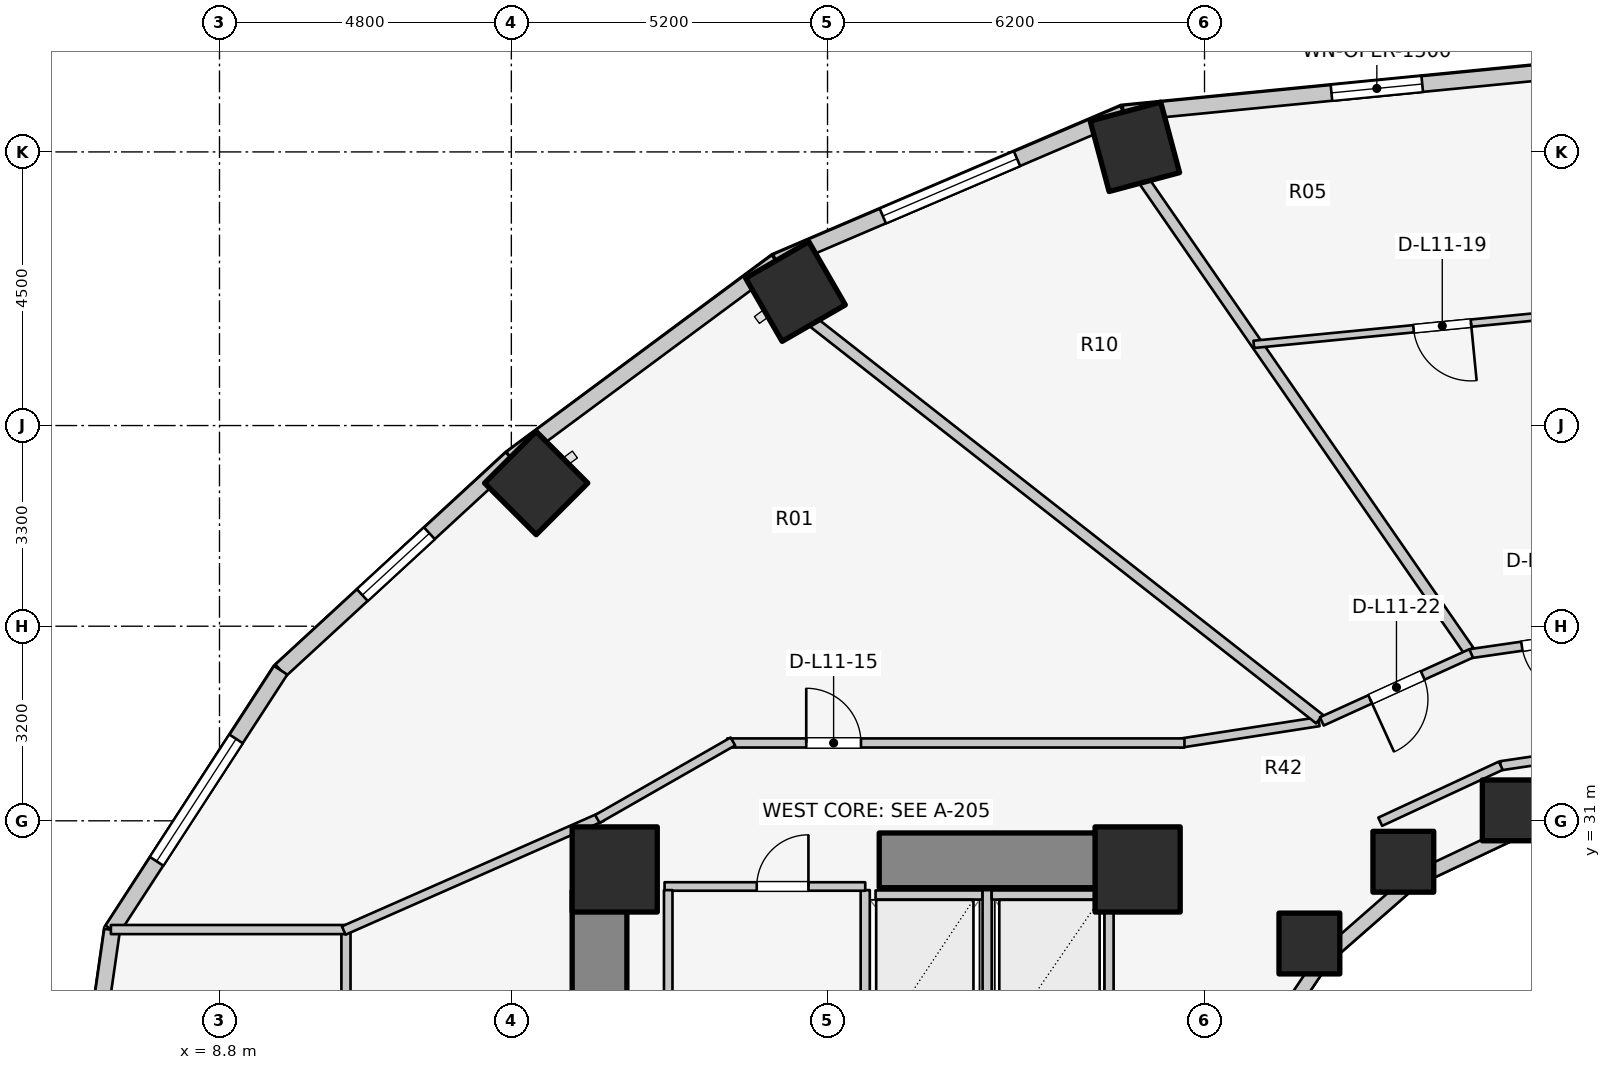
"""IFC4 building model, lengths in metres.
Left out: names, types, materials, properties, quantities, classifications, styles, units other than length and angle.
Written with IfcOpenShell. Run it as: python <this file> out.ifc"""

import sys

from ifc_helpers import new_model, si_unit, direction, frame, frame_2d, origin, origin_2d, place, context, subcontext, project, spatial, rectangle, extrude, element, fill, save


model = new_model("IFC4")
c1 = context("Model", 3, precision=1e-05, world=origin(), true_north=direction((0.0, 1.0)))
c2 = subcontext(c1, "Body", "Model", "MODEL_VIEW")
j1 = project(units=[si_unit("LENGTHUNIT", "METRE"), si_unit("PLANEANGLEUNIT", "RADIAN")], contexts=[c1])
p1 = place(None, origin())
s1 = spatial("IfcSite", under=j1, at=p1, CompositionType="ELEMENT")
p2 = place(p1, origin())
s2 = spatial("IfcBuilding", under=s1, at=p2, CompositionType="ELEMENT")
p3 = place(p2, frame((0.0, 0.0, 40.0)))
s3 = spatial("IfcBuildingStorey", under=s2, at=p3, CompositionType="ELEMENT", Elevation=40.0)
p4 = place(p3, frame((15.05, 17.05, 0.0), z_axis=(0.0, 0.0, 1.0), x_axis=(0.0, 1.0, 0.0)))
e1 = element("IfcWall", 1, at=p4, inside=s3, PredefinedType="SHEAR", context=c2, shape_type="SweptSolid", body=[
    extrude(rectangle(XDim=12.8, YDim=0.9, at=frame_2d((6.4, 0.0))), origin(), (0.0, 0.0, 1.0), 3.1),
])
p5 = place(p3, frame((19.65, 30.35, 0.0), z_axis=(0.0, 0.0, 1.0), x_axis=(1.0, 0.0, 0.0)))
e2 = element("IfcWall", 2, at=p5, inside=s3, PredefinedType="SHEAR", context=c2, shape_type="SweptSolid", body=[
    extrude(rectangle(XDim=4.5, YDim=0.9, at=frame_2d((2.25, 0.0))), origin(), (0.0, 0.0, 1.0), 3.1),
])
for number, where, z_axis, x_axis in (
    (3, (23.9, 30.2, 0.0), (0.0, 0.0, 1.0), (1.0, 0.0, 0.0)),
    (4, (15.3, 30.2, 0.0), (0.0, 0.0, 1.0), (1.0, 0.0, 0.0)),
):
    element("IfcColumn", number, at=place(p3, frame(where, z_axis=z_axis, x_axis=x_axis)), inside=s3, PredefinedType="COLUMN", context=c2, shape_type="SweptSolid", body=[
        extrude(rectangle(XDim=1.4, YDim=1.4, at=origin_2d()), origin(), (0.0, 0.0, 1.0), 3.1),
    ])
p6 = place(p3, frame((30.069, 31.172, 0.0), z_axis=(0.0, 0.0, 1.0), x_axis=(1.0, 0.0, 0.0)))
e5 = element("IfcColumn", 5, at=p6, inside=s3, PredefinedType="COLUMN", context=c2, shape_type="SweptSolid", body=[
    extrude(rectangle(XDim=1.0, YDim=1.0, at=origin_2d()), origin(), (0.0, 0.0, 1.0), 3.1),
])
p7 = place(p3, frame((23.855, 42.084, 0.0), z_axis=(0.0, 0.0, 1.0), x_axis=(-0.258819045103, 0.965925826289, 0.0)))
e6 = element("IfcColumn", 6, at=p7, inside=s3, PredefinedType="COLUMN", context=c2, shape_type="SweptSolid", body=[
    extrude(rectangle(XDim=1.2, YDim=1.2, at=origin_2d()), origin(), (0.0, 0.0, 1.0), 3.1),
])
p8 = place(p3, frame((28.27, 30.327, 0.0), z_axis=(0.0, 0.0, 1.0), x_axis=(1.0, 0.0, 0.0)))
e7 = element("IfcColumn", 7, at=p8, inside=s3, PredefinedType="COLUMN", context=c2, shape_type="SweptSolid", body=[
    extrude(rectangle(XDim=1.0, YDim=1.0, at=origin_2d()), origin(), (0.0, 0.0, 1.0), 3.1),
])
p9 = place(p3, frame((18.273, 39.704, 0.0), z_axis=(0.0, 0.0, 1.0), x_axis=(-0.5, 0.866025403784, 0.0)))
e8 = element("IfcColumn", 8, at=p9, inside=s3, PredefinedType="COLUMN", context=c2, shape_type="SweptSolid", body=[
    extrude(rectangle(XDim=1.2, YDim=1.2, at=origin_2d()), origin(), (0.0, 0.0, 1.0), 3.1),
])
p10 = place(p3, frame((26.725, 28.982, 0.0), z_axis=(0.0, 0.0, 1.0), x_axis=(1.0, 0.0, 0.0)))
e9 = element("IfcColumn", 9, at=p10, inside=s3, PredefinedType="COLUMN", context=c2, shape_type="SweptSolid", body=[
    extrude(rectangle(XDim=1.0, YDim=1.0, at=origin_2d()), origin(), (0.0, 0.0, 1.0), 3.1),
])
p11 = place(p3, frame((14.008, 36.554, 0.0), z_axis=(0.0, 0.0, 1.0), x_axis=(-0.707106781187, 0.707106781187, 0.0)))
e10 = element("IfcColumn", 10, at=p11, inside=s3, PredefinedType="COLUMN", context=c2, shape_type="SweptSolid", body=[
    extrude(rectangle(XDim=1.2, YDim=1.2, at=origin_2d()), origin(), (0.0, 0.0, 1.0), 3.1),
])
p12 = place(p3, frame((32.0, 31.12, 0.0), z_axis=(0.0, 0.0, 1.0), x_axis=(-0.988901730308, -0.148571086668, 0.0)))
e11 = element("IfcWall", 11, at=p12, inside=s3, PredefinedType="STANDARD", context=c2, shape_type="SweptSolid", body=[
    extrude(rectangle(XDim=1.864, YDim=0.23, at=frame_2d((0.932, 0.0))), origin(), (0.0, 0.0, 1.0), 2.16),
])
p13 = place(p3, frame((30.157, 30.843, 0.0), z_axis=(0.0, 0.0, 1.0), x_axis=(-0.904179699603, -0.427152280606, 0.0)))
e12 = element("IfcWall", 12, at=p13, inside=s3, PredefinedType="STANDARD", context=c2, shape_type="SweptSolid", body=[
    extrude(rectangle(XDim=1.899, YDim=0.23, at=frame_2d((0.95, 0.0))), origin(), (0.0, 0.0, 1.0), 2.16),
])
p14 = place(p3, frame((28.44, 30.032, 0.0), z_axis=(0.0, 0.0, 1.0), x_axis=(-0.752576694707, -0.658504607869, 0.0)))
e13 = element("IfcWall", 13, at=p14, inside=s3, PredefinedType="STANDARD", context=c2, shape_type="SweptSolid", body=[
    extrude(rectangle(XDim=1.959, YDim=0.23, at=frame_2d((0.98, 0.0))), origin(), (0.0, 0.0, 1.0), 2.16),
])
p15 = place(p3, frame((26.965, 28.742, 0.0), z_axis=(0.0, 0.0, 1.0), x_axis=(-0.558197800898, -0.829707909492, 0.0)))
e14 = element("IfcWall", 14, at=p15, inside=s3, PredefinedType="STANDARD", context=c2, shape_type="SweptSolid", body=[
    extrude(rectangle(XDim=2.027, YDim=0.23, at=frame_2d((1.013, 0.0))), origin(), (0.0, 0.0, 1.0), 2.16),
])
p16 = place(p3, frame((32.0, 43.451, 0.0), z_axis=(0.0, 0.0, 1.0), x_axis=(-0.995247718352, -0.097375454379, 0.0)))
e15 = element("IfcWall", 15, at=p16, inside=s3, PredefinedType="STANDARD", context=c2, shape_type="SweptSolid", body=[
    extrude(rectangle(XDim=8.372, YDim=0.26, at=frame_2d((4.186, 0.0))), origin(), (0.0, 0.0, 1.0), 2.85),
])
p17 = place(p16, frame((3.436, 0.0, 0.75)))
e16 = element("IfcOpeningElement", 16, at=p17, cuts=e15, PredefinedType="OPENING", context=c2, shape_type="SweptSolid", body=[
    extrude(rectangle(XDim=1.5, YDim=1.6, at=frame_2d((0.75, 0.8))), frame((0.0, 0.14, 0.0), z_axis=(0.0, -1.0, 0.0), x_axis=(1.0, 0.0, 0.0)), (0.0, 0.0, 1.0), 0.28),
])
p18 = place(p3, frame((23.668, 42.636, 0.0), z_axis=(0.0, 0.0, 1.0), x_axis=(-0.919612132394, -0.39282760335, 0.0)))
e17 = element("IfcWall", 17, at=p18, inside=s3, PredefinedType="STANDARD", context=c2, shape_type="SweptSolid", body=[
    extrude(rectangle(XDim=6.209, YDim=0.26, at=frame_2d((3.105, 0.0))), origin(), (0.0, 0.0, 1.0), 2.85),
])
p19 = place(p18, frame((1.905, 0.0, 0.75)))
e18 = element("IfcOpeningElement", 18, at=p19, cuts=e17, PredefinedType="OPENING", context=c2, shape_type="SweptSolid", body=[
    extrude(rectangle(XDim=2.4, YDim=1.7, at=frame_2d((1.2, 0.85))), frame((0.0, 0.14, 0.0), z_axis=(0.0, -1.0, 0.0), x_axis=(1.0, 0.0, 0.0)), (0.0, 0.0, 1.0), 0.28),
])
p20 = place(p3, frame((17.958, 40.197, 0.0), z_axis=(0.0, 0.0, 1.0), x_axis=(-0.803477531792, -0.595335078679, 0.0)))
e19 = element("IfcWall", 19, at=p20, inside=s3, PredefinedType="STANDARD", context=c2, shape_type="SweptSolid", body=[
    extrude(rectangle(XDim=5.43, YDim=0.26, at=frame_2d((2.715, 0.0))), origin(), (0.0, 0.0, 1.0), 2.85),
])
p21 = place(p3, frame((13.595, 36.965, 0.0), z_axis=(0.0, 0.0, 1.0), x_axis=(-0.735655109293, -0.67735630223, 0.0)))
e20 = element("IfcWall", 20, at=p21, inside=s3, PredefinedType="STANDARD", context=c2, shape_type="SweptSolid", body=[
    extrude(rectangle(XDim=5.151, YDim=0.26, at=frame_2d((2.575, 0.0))), origin(), (0.0, 0.0, 1.0), 2.85),
])
p22 = place(p21, frame((1.825, 0.0, 0.75)))
e21 = element("IfcOpeningElement", 21, at=p22, cuts=e20, PredefinedType="OPENING", context=c2, shape_type="SweptSolid", body=[
    extrude(rectangle(XDim=1.5, YDim=1.6, at=frame_2d((0.75, 0.8))), frame((0.0, 0.14, 0.0), z_axis=(0.0, -1.0, 0.0), x_axis=(1.0, 0.0, 0.0)), (0.0, 0.0, 1.0), 0.28),
])
p23 = place(p3, frame((9.806, 33.476, 0.0), z_axis=(0.0, 0.0, 1.0), x_axis=(-0.544578722263, -0.838709732421, 0.0)))
e22 = element("IfcWall", 22, at=p23, inside=s3, PredefinedType="STANDARD", context=c2, shape_type="SweptSolid", body=[
    extrude(rectangle(XDim=5.092, YDim=0.26, at=frame_2d((2.546, 0.0))), origin(), (0.0, 0.0, 1.0), 2.85),
])
p24 = place(p23, frame((1.346, 0.0, 0.75)))
e23 = element("IfcOpeningElement", 23, at=p24, cuts=e22, PredefinedType="OPENING", context=c2, shape_type="SweptSolid", body=[
    extrude(rectangle(XDim=2.4, YDim=1.7, at=frame_2d((1.2, 0.85))), frame((0.0, 0.14, 0.0), z_axis=(0.0, -1.0, 0.0), x_axis=(1.0, 0.0, 0.0)), (0.0, 0.0, 1.0), 0.28),
])
p25 = place(p3, frame((7.033, 29.205, 0.0), z_axis=(0.0, 0.0, 1.0), x_axis=(-0.142528001686, -0.989790770181, 0.0)))
e24 = element("IfcWall", 24, at=p25, inside=s3, PredefinedType="STANDARD", context=c2, shape_type="SweptSolid", body=[
    extrude(rectangle(XDim=6.269, YDim=0.26, at=frame_2d((3.135, 0.0))), origin(), (0.0, 0.0, 1.0), 2.85),
])
p26 = place(p25, frame((2.385, 0.0, 0.75)))
e25 = element("IfcOpeningElement", 25, at=p26, cuts=e24, PredefinedType="OPENING", context=c2, shape_type="SweptSolid", body=[
    extrude(rectangle(XDim=1.5, YDim=1.6, at=frame_2d((0.75, 0.8))), frame((0.0, 0.14, 0.0), z_axis=(0.0, -1.0, 0.0), x_axis=(1.0, 0.0, 0.0)), (0.0, 0.0, 1.0), 0.28),
])
p27 = place(p3, frame((19.59, 29.78, 0.0), z_axis=(0.0, 0.0, 1.0), x_axis=(1.0, 0.0, 0.0)))
e26 = element("IfcWall", 26, at=p27, inside=s3, PredefinedType="SOLIDWALL", context=c2, shape_type="SweptSolid", body=[
    extrude(rectangle(XDim=1.76, YDim=0.15, at=frame_2d((0.88, 0.0))), origin(), (0.0, 0.0, 1.0), 2.855),
])
for number, where, z_axis, x_axis in (
    (27, (19.42, 27.14, 0.0), (0.0, 0.0, 1.0), (0.0, 1.0, 0.0)),
    (28, (21.425, 27.14, 0.0), (0.0, 0.0, 1.0), (0.0, 1.0, 0.0)),
):
    element("IfcWall", number, at=place(p3, frame(where, z_axis=z_axis, x_axis=x_axis)), inside=s3, PredefinedType="SOLIDWALL", context=c2, shape_type="SweptSolid", body=[
        extrude(rectangle(XDim=2.72, YDim=0.15, at=frame_2d((1.36, 0.0))), origin(), (0.0, 0.0, 1.0), 2.855),
    ])
p28 = place(p3, frame((21.5, 29.78, 0.0), z_axis=(0.0, 0.0, 1.0), x_axis=(1.0, 0.0, 0.0)))
e29 = element("IfcWall", 29, at=p28, inside=s3, PredefinedType="SOLIDWALL", context=c2, shape_type="SweptSolid", body=[
    extrude(rectangle(XDim=1.76, YDim=0.15, at=frame_2d((0.88, 0.0))), origin(), (0.0, 0.0, 1.0), 2.855),
])
p29 = place(p3, frame((23.43, 27.14, 0.0), z_axis=(0.0, 0.0, 1.0), x_axis=(0.0, 1.0, 0.0)))
e30 = element("IfcWall", 30, at=p29, inside=s3, PredefinedType="SOLIDWALL", context=c2, shape_type="SweptSolid", body=[
    extrude(rectangle(XDim=2.72, YDim=0.15, at=frame_2d((1.36, 0.0))), origin(), (0.0, 0.0, 1.0), 2.855),
])
p30 = place(p3, frame((16.12, 29.92, 0.0), z_axis=(0.0, 0.0, 1.0), x_axis=(1.0, 0.0, 0.0)))
e31 = element("IfcWall", 31, at=p30, inside=s3, PredefinedType="PLUMBINGWALL", context=c2, shape_type="SweptSolid", body=[
    extrude(rectangle(XDim=3.3, YDim=0.14, at=frame_2d((1.65, 0.0))), origin(), (0.0, 0.0, 1.0), 2.855),
])
p31 = place(p30, frame((1.516, 0.0, 0.0)))
e32 = element("IfcOpeningElement", 32, at=p31, cuts=e31, PredefinedType="OPENING", context=c2, shape_type="SweptSolid", body=[
    extrude(rectangle(XDim=0.85, YDim=2.05, at=frame_2d((0.425, 1.025))), frame((0.0, 0.08, 0.0), z_axis=(0.0, -1.0, 0.0), x_axis=(1.0, 0.0, 0.0)), (0.0, 0.0, 1.0), 0.16),
])
p32 = place(p3, frame((16.18, 25.98, 0.0), z_axis=(0.0, 0.0, 1.0), x_axis=(0.0, 1.0, 0.0)))
e33 = element("IfcWall", 33, at=p32, inside=s3, PredefinedType="PLUMBINGWALL", context=c2, shape_type="SweptSolid", body=[
    extrude(rectangle(XDim=3.88, YDim=0.14, at=frame_2d((1.94, 0.0))), origin(), (0.0, 0.0, 1.0), 2.855),
])
p33 = place(p3, frame((32.0, 32.22, 0.0), z_axis=(0.0, 0.0, 1.0), x_axis=(-0.989268584896, -0.146108408166, 0.0)))
e34 = element("IfcWall", 34, at=p33, inside=s3, PredefinedType="PARTITIONING", context=c2, shape_type="SweptSolid", body=[
    extrude(rectangle(XDim=2.151, YDim=0.15, at=frame_2d((1.075, 0.0))), origin(), (0.0, 0.0, 1.0), 2.237),
])
p34 = place(p3, frame((29.873, 31.906, 0.0), z_axis=(0.0, 0.0, 1.0), x_axis=(-0.906943449489, -0.421252393975, 0.0)))
e35 = element("IfcWall", 35, at=p34, inside=s3, PredefinedType="PARTITIONING", context=c2, shape_type="SweptSolid", body=[
    extrude(rectangle(XDim=2.186, YDim=0.15, at=frame_2d((1.093, 0.0))), origin(), (0.0, 0.0, 1.0), 2.237),
])
p35 = place(p3, frame((10.88, 16.748, 0.0), z_axis=(0.0, 0.0, 1.0), x_axis=(0.0, 1.0, 0.0)))
e36 = element("IfcWall", 36, at=p35, inside=s3, PredefinedType="PARTITIONING", context=c2, shape_type="SweptSolid", body=[
    extrude(rectangle(XDim=12.503, YDim=0.15, at=frame_2d((6.252, 0.0))), origin(), (0.0, 0.0, 1.0), 2.12),
])
p36 = place(p3, frame((7.014, 29.212, 0.0), z_axis=(0.0, 0.0, 1.0), x_axis=(1.0, 0.0, 0.0)))
e37 = element("IfcWall", 37, at=p36, inside=s3, PredefinedType="PARTITIONING", context=c2, shape_type="SweptSolid", body=[
    extrude(rectangle(XDim=3.866, YDim=0.15, at=frame_2d((1.933, 0.0))), origin(), (0.0, 0.0, 1.0), 2.855),
])
p37 = place(p3, frame((10.844, 29.196, 0.0), z_axis=(0.0, 0.0, 1.0), x_axis=(0.91502756289, 0.403391322604, 0.0)))
e38 = element("IfcWall", 38, at=p37, inside=s3, PredefinedType="PARTITIONING", context=c2, shape_type="SweptSolid", body=[
    extrude(rectangle(XDim=4.637, YDim=0.15, at=frame_2d((2.319, 0.0))), origin(), (0.0, 0.0, 1.0), 2.069),
])
p38 = place(p3, frame((26.881, 32.631, 0.0), z_axis=(0.0, 0.0, 1.0), x_axis=(-0.988184633586, -0.153268163508, 0.0)))
e39 = element("IfcWall", 39, at=p38, inside=s3, PredefinedType="PARTITIONING", context=c2, shape_type="SweptSolid", body=[
    extrude(rectangle(XDim=2.318, YDim=0.15, at=frame_2d((1.159, 0.0))), origin(), (0.0, 0.0, 1.0), 2.237),
])
p39 = place(p3, frame((17.15, 32.28, 0.0), z_axis=(0.0, 0.0, 1.0), x_axis=(1.0, 0.0, 0.0)))
e40 = element("IfcWall", 40, at=p39, inside=s3, PredefinedType="PARTITIONING", context=c2, shape_type="SweptSolid", body=[
    extrude(rectangle(XDim=7.52, YDim=0.15, at=frame_2d((3.76, 0.0))), origin(), (0.0, 0.0, 1.0), 2.237),
])
p40 = place(p39, frame((1.3, 0.0, 0.0)))
e41 = element("IfcOpeningElement", 41, at=p40, cuts=e40, PredefinedType="OPENING", context=c2, shape_type="SweptSolid", body=[
    extrude(rectangle(XDim=0.9, YDim=2.1, at=frame_2d((0.45, 1.05))), frame((0.0, 0.085, 0.0), z_axis=(0.0, -1.0, 0.0), x_axis=(1.0, 0.0, 0.0)), (0.0, 0.0, 1.0), 0.17),
])
p41 = place(p3, frame((17.243, 32.305, 0.0), z_axis=(0.0, 0.0, 1.0), x_axis=(-0.867991349648, -0.496579315857, 0.0)))
e42 = element("IfcWall", 42, at=p41, inside=s3, PredefinedType="PARTITIONING", context=c2, shape_type="SweptSolid", body=[
    extrude(rectangle(XDim=2.567, YDim=0.15, at=frame_2d((1.283, 0.0))), origin(), (0.0, 0.0, 1.0), 2.069),
])
p42 = place(p3, frame((29.347, 33.796, 0.0), z_axis=(0.0, 0.0, 1.0), x_axis=(-0.568631434817, 0.822592421153, 0.0)))
e43 = element("IfcWall", 43, at=p42, inside=s3, PredefinedType="PARTITIONING", context=c2, shape_type="SweptSolid", body=[
    extrude(rectangle(XDim=9.394, YDim=0.18, at=frame_2d((4.697, 0.0))), origin(), (0.0, 0.0, 1.0), 2.237),
])
p43 = place(p3, frame((26.892, 32.673, 0.0), z_axis=(0.0, 0.0, 1.0), x_axis=(-0.78700868866, 0.616941912966, 0.0)))
e44 = element("IfcWall", 44, at=p43, inside=s3, PredefinedType="PARTITIONING", context=c2, shape_type="SweptSolid", body=[
    extrude(rectangle(XDim=10.583, YDim=0.18, at=frame_2d((5.292, 0.0))), origin(), (0.0, 0.0, 1.0), 2.237),
])
p44 = place(p3, frame((32.01, 39.441, 0.0), z_axis=(0.0, 0.0, 1.0), x_axis=(-0.995257435484, -0.097276087063, 0.0)))
e45 = element("IfcWall", 45, at=p44, inside=s3, PredefinedType="MOVABLE", context=c2, shape_type="SweptSolid", body=[
    extrude(rectangle(XDim=6.229, YDim=0.12, at=frame_2d((3.115, 0.0))), origin(), (0.0, 0.0, 1.0), 2.237),
])
p45 = place(p44, frame((2.64, 0.0, 0.0)))
e46 = element("IfcOpeningElement", 46, at=p45, cuts=e45, PredefinedType="OPENING", context=c2, shape_type="SweptSolid", body=[
    extrude(rectangle(XDim=0.95, YDim=2.1, at=frame_2d((0.475, 1.05))), frame((0.0, 0.07, 0.0), z_axis=(0.0, -1.0, 0.0), x_axis=(1.0, 0.0, 0.0)), (0.0, 0.0, 1.0), 0.14),
])
p46 = place(p3, frame((32.007, 34.13, 0.0), z_axis=(0.0, 0.0, 1.0), x_axis=(-0.989707881179, -0.143102445584, 0.0)))
e47 = element("IfcWall", 47, at=p46, inside=s3, PredefinedType="PARTITIONING", context=c2, shape_type="SweptSolid", body=[
    extrude(rectangle(XDim=2.663, YDim=0.15, at=frame_2d((1.332, 0.0))), origin(), (0.0, 0.0, 1.0), 2.237),
])
p47 = place(p46, frame((0.857, 0.0, 0.0)))
e48 = element("IfcOpeningElement", 48, at=p47, cuts=e47, PredefinedType="OPENING", context=c2, shape_type="SweptSolid", body=[
    extrude(rectangle(XDim=0.95, YDim=2.1, at=frame_2d((0.475, 1.05))), frame((0.0, 0.085, 0.0), z_axis=(0.0, -1.0, 0.0), x_axis=(1.0, 0.0, 0.0)), (0.0, 0.0, 1.0), 0.17),
])
p48 = place(p3, frame((29.385, 33.753, 0.0), z_axis=(0.0, 0.0, 1.0), x_axis=(-0.910186679378, -0.414198272186, 0.0)))
e49 = element("IfcWall", 49, at=p48, inside=s3, PredefinedType="PARTITIONING", context=c2, shape_type="SweptSolid", body=[
    extrude(rectangle(XDim=2.698, YDim=0.15, at=frame_2d((1.349, 0.0))), origin(), (0.0, 0.0, 1.0), 2.237),
])
p49 = place(p48, frame((0.874, 0.0, 0.0)))
e50 = element("IfcOpeningElement", 50, at=p49, cuts=e49, PredefinedType="OPENING", context=c2, shape_type="SweptSolid", body=[
    extrude(rectangle(XDim=0.95, YDim=2.1, at=frame_2d((0.475, 1.05))), frame((0.0, 0.085, 0.0), z_axis=(0.0, -1.0, 0.0), x_axis=(1.0, 0.0, 0.0)), (0.0, 0.0, 1.0), 0.17),
])
p50 = place(p17, origin())
e51 = element("IfcWindow", 51, at=p50, inside=s3, PartitioningType="SINGLE_PANEL", PredefinedType="WINDOW", context=c2, shape_type="SweptSolid", body=[
    extrude(rectangle(XDim=1.5, YDim=1.6, at=frame_2d((0.75, 0.8))), frame((0.0, 0.03, 0.0), z_axis=(0.0, -1.0, 0.0), x_axis=(1.0, 0.0, 0.0)), (0.0, 0.0, 1.0), 0.06),
])
fill(e16, e51)
p51 = place(p19, origin())
e52 = element("IfcWindow", 52, at=p51, inside=s3, PartitioningType="SINGLE_PANEL", PredefinedType="WINDOW", context=c2, shape_type="SweptSolid", body=[
    extrude(rectangle(XDim=2.4, YDim=1.7, at=frame_2d((1.2, 0.85))), frame((0.0, 0.03, 0.0), z_axis=(0.0, -1.0, 0.0), x_axis=(1.0, 0.0, 0.0)), (0.0, 0.0, 1.0), 0.06),
])
fill(e18, e52)
p52 = place(p22, origin())
e53 = element("IfcWindow", 53, at=p52, inside=s3, PartitioningType="SINGLE_PANEL", PredefinedType="WINDOW", context=c2, shape_type="SweptSolid", body=[
    extrude(rectangle(XDim=1.5, YDim=1.6, at=frame_2d((0.75, 0.8))), frame((0.0, 0.03, 0.0), z_axis=(0.0, -1.0, 0.0), x_axis=(1.0, 0.0, 0.0)), (0.0, 0.0, 1.0), 0.06),
])
fill(e21, e53)
p53 = place(p24, origin())
e54 = element("IfcWindow", 54, at=p53, inside=s3, PartitioningType="SINGLE_PANEL", PredefinedType="WINDOW", context=c2, shape_type="SweptSolid", body=[
    extrude(rectangle(XDim=2.4, YDim=1.7, at=frame_2d((1.2, 0.85))), frame((0.0, 0.03, 0.0), z_axis=(0.0, -1.0, 0.0), x_axis=(1.0, 0.0, 0.0)), (0.0, 0.0, 1.0), 0.06),
])
fill(e23, e54)
p54 = place(p31, origin())
e55 = element("IfcDoor", 55, at=p54, inside=s3, OperationType="SINGLE_SWING_RIGHT", PredefinedType="DOOR", context=c2, shape_type="SweptSolid", body=[
    extrude(rectangle(XDim=0.85, YDim=2.05, at=frame_2d((0.425, 1.025))), frame((0.0, 0.025, 0.0), z_axis=(0.0, -1.0, 0.0), x_axis=(1.0, 0.0, 0.0)), (0.0, 0.0, 1.0), 0.05),
])
fill(e32, e55)
p55 = place(p40, origin())
e56 = element("IfcDoor", 56, at=p55, inside=s3, OperationType="SINGLE_SWING_LEFT", PredefinedType="DOOR", context=c2, shape_type="SweptSolid", body=[
    extrude(rectangle(XDim=0.9, YDim=2.1, at=frame_2d((0.45, 1.05))), frame((0.0, 0.025, 0.0), z_axis=(0.0, -1.0, 0.0), x_axis=(1.0, 0.0, 0.0)), (0.0, 0.0, 1.0), 0.05),
])
fill(e41, e56)
p56 = place(p45, origin())
e57 = element("IfcDoor", 57, at=p56, inside=s3, OperationType="SINGLE_SWING_LEFT", PredefinedType="DOOR", context=c2, shape_type="SweptSolid", body=[
    extrude(rectangle(XDim=0.95, YDim=2.1, at=frame_2d((0.475, 1.05))), frame((0.0, 0.025, 0.0), z_axis=(0.0, -1.0, 0.0), x_axis=(1.0, 0.0, 0.0)), (0.0, 0.0, 1.0), 0.05),
])
fill(e46, e57)
p57 = place(p47, origin())
e58 = element("IfcDoor", 58, at=p57, inside=s3, OperationType="SINGLE_SWING_LEFT", PredefinedType="DOOR", context=c2, shape_type="SweptSolid", body=[
    extrude(rectangle(XDim=0.95, YDim=2.1, at=frame_2d((0.475, 1.05))), frame((0.0, 0.025, 0.0), z_axis=(0.0, -1.0, 0.0), x_axis=(1.0, 0.0, 0.0)), (0.0, 0.0, 1.0), 0.05),
])
fill(e48, e58)
p58 = place(p49, origin())
e59 = element("IfcDoor", 59, at=p58, inside=s3, OperationType="SINGLE_SWING_RIGHT", PredefinedType="DOOR", context=c2, shape_type="SweptSolid", body=[
    extrude(rectangle(XDim=0.95, YDim=2.1, at=frame_2d((0.475, 1.05))), frame((0.0, 0.025, 0.0), z_axis=(0.0, -1.0, 0.0), x_axis=(1.0, 0.0, 0.0)), (0.0, 0.0, 1.0), 0.05),
])
fill(e50, e59)
save(model, sys.argv[1])
